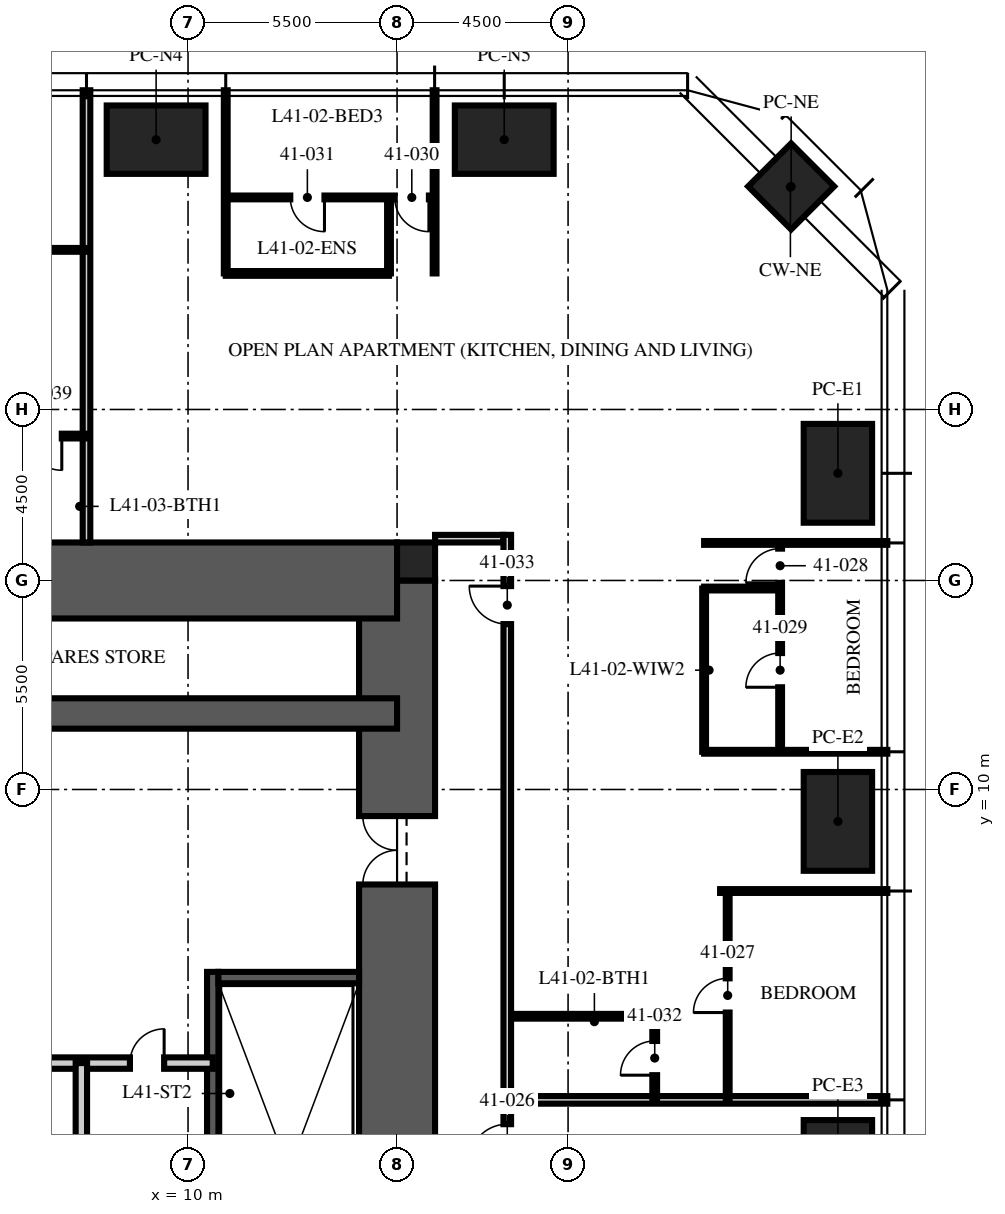
"""IFC4 building model, lengths in metres.
Left out: names, types, materials, properties, quantities, classifications, styles, units other than length and angle.
Written with IfcOpenShell. Run it as: python <this file> out.ifc"""

import sys

from ifc_helpers import new_model, si_unit, direction, frame, frame_2d, origin, origin_2d, place, context, subcontext, project, spatial, rectangle, extrude, element, fill, save


model = new_model("IFC4")
c1 = context("Model", 3, precision=1e-05, world=origin(), true_north=direction((0.0, 1.0)))
c2 = subcontext(c1, "Body", "Model", "MODEL_VIEW")
j1 = project(units=[si_unit("LENGTHUNIT", "METRE"), si_unit("PLANEANGLEUNIT", "RADIAN")], contexts=[c1])
p1 = place(None, origin())
s1 = spatial("IfcSite", under=j1, at=p1, CompositionType="ELEMENT")
p2 = place(p1, origin())
s2 = spatial("IfcBuilding", under=s1, at=p2, CompositionType="ELEMENT")
p3 = place(p2, frame((0.0, 0.0, 163.5)))
s3 = spatial("IfcBuildingStorey", under=s2, at=p3, CompositionType="ELEMENT", Elevation=163.5)
p4 = place(p3, frame((15.5, -15.5, -0.25), z_axis=(0.0, 0.0, 1.0), x_axis=(0.0, 1.0, 0.0)))
e1 = element("IfcWall", 1, at=p4, inside=s3, PredefinedType="SHEAR", context=c2, shape_type="SweptSolid", body=[
    extrude(rectangle(XDim=31.0, YDim=2.0, at=frame_2d((15.5, 0.0))), origin(), (0.0, 0.0, 1.0), 3.75),
])
p5 = place(p4, frame((6.5, 0.0, 0.25)))
e2 = element("IfcOpeningElement", 2, at=p5, cuts=e1, PredefinedType="OPENING", context=c2, shape_type="SweptSolid", body=[
    extrude(rectangle(XDim=1.2, YDim=2.1, at=frame_2d((0.6, 1.05))), frame((0.0, 1.01, 0.0), z_axis=(0.0, -1.0, 0.0), x_axis=(1.0, 0.0, 0.0)), (0.0, 0.0, 1.0), 2.02),
])
p6 = place(p4, frame((23.0, 0.0, 0.25)))
e3 = element("IfcOpeningElement", 3, at=p6, cuts=e1, PredefinedType="OPENING", context=c2, shape_type="SweptSolid", body=[
    extrude(rectangle(XDim=1.8, YDim=2.1, at=frame_2d((0.9, 1.05))), frame((0.0, 1.01, 0.0), z_axis=(0.0, -1.0, 0.0), x_axis=(1.0, 0.0, 0.0)), (0.0, 0.0, 1.0), 2.02),
])
p7 = place(p3, frame((-15.5, 15.5, -0.25), z_axis=(0.0, 0.0, 1.0), x_axis=(1.0, 0.0, 0.0)))
e4 = element("IfcWall", 4, at=p7, inside=s3, PredefinedType="SHEAR", context=c2, shape_type="SweptSolid", body=[
    extrude(rectangle(XDim=31.0, YDim=2.0, at=frame_2d((15.5, 0.0))), origin(), (0.0, 0.0, 1.0), 3.75),
])
p8 = place(p7, frame((5.0, 0.0, 0.25)))
e5 = element("IfcOpeningElement", 5, at=p8, cuts=e4, PredefinedType="OPENING", context=c2, shape_type="SweptSolid", body=[
    extrude(rectangle(XDim=1.0, YDim=2.1, at=frame_2d((0.5, 1.05))), frame((0.0, 1.01, 0.0), z_axis=(0.0, -1.0, 0.0), x_axis=(1.0, 0.0, 0.0)), (0.0, 0.0, 1.0), 2.02),
])
p9 = place(p3, frame((-15.5, 12.0, -0.25), z_axis=(0.0, 0.0, 1.0), x_axis=(1.0, 0.0, 0.0)))
e6 = element("IfcWall", 6, at=p9, inside=s3, PredefinedType="SHEAR", context=c2, shape_type="SweptSolid", body=[
    extrude(rectangle(XDim=31.0, YDim=0.8, at=frame_2d((15.5, 0.0))), origin(), (0.0, 0.0, 1.0), 3.75),
])
p10 = place(p3, frame((16.0, 16.0, -0.25), z_axis=(0.0, 0.0, 1.0), x_axis=(1.0, 0.0, 0.0)))
e7 = element("IfcColumn", 7, at=p10, inside=s3, PredefinedType="COLUMN", context=c2, shape_type="SweptSolid", body=[
    extrude(rectangle(XDim=1.0, YDim=1.0, at=origin_2d()), origin(), (0.0, 0.0, 1.0), 3.75),
])
for number, where, z_axis, x_axis in (
    (8, (9.16, 27.1, 0.0), (0.0, 0.0, 1.0), (1.0, 0.0, 0.0)),
    (9, (18.32, 27.1, 0.0), (0.0, 0.0, 1.0), (1.0, 0.0, 0.0)),
    (10, (27.1, 18.32, 0.0), (0.0, 0.0, 1.0), (0.0, 1.0, 0.0)),
    (11, (27.1, 9.16, 0.0), (0.0, 0.0, 1.0), (0.0, 1.0, 0.0)),
    (12, (27.1, 0.0, 0.0), (0.0, 0.0, 1.0), (0.0, 1.0, 0.0)),
):
    element("IfcColumn", number, at=place(p3, frame(where, z_axis=z_axis, x_axis=x_axis)), inside=s3, PredefinedType="COLUMN", context=c2, shape_type="SweptSolid", body=[
        extrude(rectangle(XDim=2.6, YDim=1.8, at=origin_2d()), origin(), (0.0, 0.0, 1.0), 3.75),
    ])
p11 = place(p3, frame((25.87, 25.87, 0.0), z_axis=(0.0, 0.0, 1.0), x_axis=(0.707106781187, -0.707106781187, 0.0)))
e13 = element("IfcColumn", 13, at=p11, inside=s3, PredefinedType="COLUMN", context=c2, shape_type="SweptSolid", body=[
    extrude(rectangle(XDim=1.6, YDim=1.6, at=origin_2d()), origin(), (0.0, 0.0, 1.0), 3.75),
])
p12 = place(p3, frame((10.65, -4.9, 0.0), z_axis=(0.0, 0.0, 1.0), x_axis=(0.0, 1.0, 0.0)))
e14 = element("IfcWall", 14, at=p12, inside=s3, PredefinedType="SOLIDWALL", context=c2, shape_type="SweptSolid", body=[
    extrude(rectangle(XDim=10.1, YDim=0.3, at=frame_2d((5.05, 0.0))), origin(), (0.0, 0.0, 1.0), 3.5),
])
p13 = place(p3, frame((14.5, 5.05, 0.0), z_axis=(0.0, 0.0, 1.0), x_axis=(-1.0, 0.0, 0.0)))
e15 = element("IfcWall", 15, at=p13, inside=s3, PredefinedType="SOLIDWALL", context=c2, shape_type="SweptSolid", body=[
    extrude(rectangle(XDim=3.7, YDim=0.3, at=frame_2d((1.85, 0.0))), origin(), (0.0, 0.0, 1.0), 3.5),
])
p14 = place(p3, frame((-10.65, 2.8, 0.0), z_axis=(0.0, 0.0, 1.0), x_axis=(1.0, 0.0, 0.0)))
e16 = element("IfcWall", 16, at=p14, inside=s3, PredefinedType="PARTITIONING", context=c2, shape_type="SweptSolid", body=[
    extrude(rectangle(XDim=21.3, YDim=0.3, at=frame_2d((10.65, 0.0))), origin(), (0.0, 0.0, 1.0), 3.5),
])
p15 = place(p14, frame((10.05, 0.0, 0.0)))
e17 = element("IfcOpeningElement", 17, at=p15, cuts=e16, PredefinedType="OPENING", context=c2, shape_type="SweptSolid", body=[
    extrude(rectangle(XDim=1.2, YDim=2.1, at=frame_2d((0.6, 1.05))), frame((0.0, 0.16, 0.0), z_axis=(0.0, -1.0, 0.0), x_axis=(1.0, 0.0, 0.0)), (0.0, 0.0, 1.0), 0.32),
])
p16 = place(p14, frame((19.121, 0.0, 0.0)))
e18 = element("IfcOpeningElement", 18, at=p16, cuts=e16, PredefinedType="OPENING", context=c2, shape_type="SweptSolid", body=[
    extrude(rectangle(XDim=0.9, YDim=2.1, at=frame_2d((0.45, 1.05))), frame((0.0, 0.16, 0.0), z_axis=(0.0, -1.0, 0.0), x_axis=(1.0, 0.0, 0.0)), (0.0, 0.0, 1.0), 0.32),
])
p17 = place(p3, frame((7.193, -6.65, 0.0), z_axis=(0.0, 0.0, 1.0), x_axis=(0.0, 1.0, 0.0)))
e19 = element("IfcWall", 19, at=p17, inside=s3, PredefinedType="PARTITIONING", context=c2, shape_type="SweptSolid", body=[
    extrude(rectangle(XDim=9.45, YDim=0.3, at=frame_2d((4.725, 0.0))), origin(), (0.0, 0.0, 1.0), 3.5),
])
p18 = place(p3, frame((16.5, 16.6, 0.0), z_axis=(0.0, 0.0, 1.0), x_axis=(1.0, 0.0, 0.0)))
e20 = element("IfcWall", 20, at=p18, inside=s3, PredefinedType="PARTITIONING", context=c2, shape_type="SweptSolid", body=[
    extrude(rectangle(XDim=1.8, YDim=0.2, at=frame_2d((0.9, 0.0))), origin(), (0.0, 0.0, 1.0), 2.3),
])
p19 = place(p3, frame((18.5, 1.832, 0.0), z_axis=(0.0, 0.0, 1.0), x_axis=(1.0, 0.0, 0.0)))
e21 = element("IfcWall", 21, at=p19, inside=s3, PredefinedType="PARTITIONING", context=c2, shape_type="SweptSolid", body=[
    extrude(rectangle(XDim=9.9, YDim=0.2, at=frame_2d((4.95, 0.0))), origin(), (0.0, 0.0, 1.0), 2.81),
])
p20 = place(p3, frame((24.0, 7.328, 0.0), z_axis=(0.0, 0.0, 1.0), x_axis=(1.0, 0.0, 0.0)))
e22 = element("IfcWall", 22, at=p20, inside=s3, PredefinedType="PARTITIONING", context=c2, shape_type="SweptSolid", body=[
    extrude(rectangle(XDim=4.4, YDim=0.1, at=frame_2d((2.2, 0.0))), origin(), (0.0, 0.0, 1.0), 2.81),
])
for number, where, z_axis, x_axis in (
    (23, (23.58, 10.992, 0.0), (0.0, 0.0, 1.0), (1.0, 0.0, 0.0)),
    (24, (23.58, 16.488, 0.0), (0.0, 0.0, 1.0), (1.0, 0.0, 0.0)),
    (25, (16.488, 23.58, 0.0), (0.0, 0.0, 1.0), (0.0, 1.0, 0.0)),
    (26, (10.992, 23.58, 0.0), (0.0, 0.0, 1.0), (0.0, 1.0, 0.0)),
):
    element("IfcWall", number, at=place(p3, frame(where, z_axis=z_axis, x_axis=x_axis)), inside=s3, PredefinedType="PARTITIONING", context=c2, shape_type="SweptSolid", body=[
        extrude(rectangle(XDim=4.82, YDim=0.1, at=frame_2d((2.41, 0.0))), origin(), (0.0, 0.0, 1.0), 2.81),
    ])
p21 = place(p3, frame((7.328, 16.5, 0.0), z_axis=(0.0, 0.0, 1.0), x_axis=(0.0, 1.0, 0.0)))
e27 = element("IfcWall", 27, at=p21, inside=s3, PredefinedType="PARTITIONING", context=c2, shape_type="SweptSolid", body=[
    extrude(rectangle(XDim=11.9, YDim=0.2, at=frame_2d((5.95, 0.0))), origin(), (0.0, 0.0, 1.0), 2.81),
])
p22 = place(p3, frame((24.2, 1.832, 0.0), z_axis=(0.0, 0.0, 1.0), x_axis=(0.0, 1.0, 0.0)))
e28 = element("IfcWall", 28, at=p22, inside=s3, PredefinedType="PARTITIONING", context=c2, shape_type="SweptSolid", body=[
    extrude(rectangle(XDim=5.496, YDim=0.1, at=frame_2d((2.748, 0.0))), origin(), (0.0, 0.0, 1.0), 2.81),
])
p23 = place(p22, frame((2.298, 0.0, 0.0)))
e29 = element("IfcOpeningElement", 29, at=p23, cuts=e28, PredefinedType="OPENING", context=c2, shape_type="SweptSolid", body=[
    extrude(rectangle(XDim=0.9, YDim=2.1, at=frame_2d((0.45, 1.05))), frame((0.0, 0.06, 0.0), z_axis=(0.0, -1.0, 0.0), x_axis=(1.0, 0.0, 0.0)), (0.0, 0.0, 1.0), 0.12),
])
p24 = place(p3, frame((25.58, 10.992, 0.0), z_axis=(0.0, 0.0, 1.0), x_axis=(0.0, 1.0, 0.0)))
e30 = element("IfcWall", 30, at=p24, inside=s3, PredefinedType="PARTITIONING", context=c2, shape_type="SweptSolid", body=[
    extrude(rectangle(XDim=5.496, YDim=0.1, at=frame_2d((2.748, 0.0))), origin(), (0.0, 0.0, 1.0), 2.81),
])
p25 = place(p24, frame((4.446, 0.0, 0.0)))
e31 = element("IfcOpeningElement", 31, at=p25, cuts=e30, PredefinedType="OPENING", context=c2, shape_type="SweptSolid", body=[
    extrude(rectangle(XDim=0.9, YDim=2.1, at=frame_2d((0.45, 1.05))), frame((0.0, 0.06, 0.0), z_axis=(0.0, -1.0, 0.0), x_axis=(1.0, 0.0, 0.0)), (0.0, 0.0, 1.0), 0.12),
])
p26 = place(p24, frame((1.698, 0.0, 0.0)))
e32 = element("IfcOpeningElement", 32, at=p26, cuts=e30, PredefinedType="OPENING", context=c2, shape_type="SweptSolid", body=[
    extrude(rectangle(XDim=0.9, YDim=2.1, at=frame_2d((0.45, 1.05))), frame((0.0, 0.06, 0.0), z_axis=(0.0, -1.0, 0.0), x_axis=(1.0, 0.0, 0.0)), (0.0, 0.0, 1.0), 0.12),
])
p27 = place(p3, frame((23.58, 15.288, 0.0), z_axis=(0.0, 0.0, 1.0), x_axis=(1.0, 0.0, 0.0)))
e33 = element("IfcWall", 33, at=p27, inside=s3, PredefinedType="PARTITIONING", context=c2, shape_type="SweptSolid", body=[
    extrude(rectangle(XDim=2.0, YDim=0.1, at=frame_2d((1.0, 0.0))), origin(), (0.0, 0.0, 1.0), 3.5),
])
p28 = place(p3, frame((23.58, 10.992, 0.0), z_axis=(0.0, 0.0, 1.0), x_axis=(0.0, 1.0, 0.0)))
e34 = element("IfcWall", 34, at=p28, inside=s3, PredefinedType="PARTITIONING", context=c2, shape_type="SweptSolid", body=[
    extrude(rectangle(XDim=4.296, YDim=0.1, at=frame_2d((2.148, 0.0))), origin(), (0.0, 0.0, 1.0), 2.81),
])
p29 = place(p3, frame((16.488, 25.58, 0.0), z_axis=(0.0, 0.0, 1.0), x_axis=(-1.0, 0.0, 0.0)))
e35 = element("IfcWall", 35, at=p29, inside=s3, PredefinedType="PARTITIONING", context=c2, shape_type="SweptSolid", body=[
    extrude(rectangle(XDim=5.496, YDim=0.1, at=frame_2d((2.748, 0.0))), origin(), (0.0, 0.0, 1.0), 2.81),
])
p30 = place(p29, frame((0.15, 0.0, 0.0)))
e36 = element("IfcOpeningElement", 36, at=p30, cuts=e35, PredefinedType="OPENING", context=c2, shape_type="SweptSolid", body=[
    extrude(rectangle(XDim=0.9, YDim=2.1, at=frame_2d((0.45, 1.05))), frame((0.0, 0.06, 0.0), z_axis=(0.0, -1.0, 0.0), x_axis=(1.0, 0.0, 0.0)), (0.0, 0.0, 1.0), 0.12),
])
p31 = place(p29, frame((2.898, 0.0, 0.0)))
e37 = element("IfcOpeningElement", 37, at=p31, cuts=e35, PredefinedType="OPENING", context=c2, shape_type="SweptSolid", body=[
    extrude(rectangle(XDim=0.9, YDim=2.1, at=frame_2d((0.45, 1.05))), frame((0.0, 0.06, 0.0), z_axis=(0.0, -1.0, 0.0), x_axis=(1.0, 0.0, 0.0)), (0.0, 0.0, 1.0), 0.12),
])
p32 = place(p3, frame((15.288, 23.58, 0.0), z_axis=(0.0, 0.0, 1.0), x_axis=(0.0, 1.0, 0.0)))
e38 = element("IfcWall", 38, at=p32, inside=s3, PredefinedType="PARTITIONING", context=c2, shape_type="SweptSolid", body=[
    extrude(rectangle(XDim=2.0, YDim=0.1, at=frame_2d((1.0, 0.0))), origin(), (0.0, 0.0, 1.0), 3.5),
])
p33 = place(p3, frame((15.288, 23.58, 0.0), z_axis=(0.0, 0.0, 1.0), x_axis=(-1.0, 0.0, 0.0)))
e39 = element("IfcWall", 39, at=p33, inside=s3, PredefinedType="PARTITIONING", context=c2, shape_type="SweptSolid", body=[
    extrude(rectangle(XDim=4.296, YDim=0.125, at=frame_2d((2.148, 0.0))), origin(), (0.0, 0.0, 1.0), 2.81),
])
p34 = place(p3, frame((22.28, 1.832, 0.0), z_axis=(0.0, 0.0, 1.0), x_axis=(0.0, 1.0, 0.0)))
e40 = element("IfcWall", 40, at=p34, inside=s3, PredefinedType="PARTITIONING", context=c2, shape_type="SweptSolid", body=[
    extrude(rectangle(XDim=2.2, YDim=0.125, at=frame_2d((1.1, 0.0))), origin(), (0.0, 0.0, 1.0), 3.5),
])
p35 = place(p34, frame((0.65, 0.0, 0.0)))
e41 = element("IfcOpeningElement", 41, at=p35, cuts=e40, PredefinedType="OPENING", context=c2, shape_type="SweptSolid", body=[
    extrude(rectangle(XDim=0.9, YDim=2.1, at=frame_2d((0.45, 1.05))), frame((0.0, 0.073, 0.0), z_axis=(0.0, -1.0, 0.0), x_axis=(1.0, 0.0, 0.0)), (0.0, 0.0, 1.0), 0.145),
])
p36 = place(p3, frame((18.5, 4.032, 0.0), z_axis=(0.0, 0.0, 1.0), x_axis=(1.0, 0.0, 0.0)))
e42 = element("IfcWall", 42, at=p36, inside=s3, PredefinedType="PARTITIONING", context=c2, shape_type="SweptSolid", body=[
    extrude(rectangle(XDim=3.78, YDim=0.125, at=frame_2d((1.89, 0.0))), origin(), (0.0, 0.0, 1.0), 3.5),
])
p37 = place(p3, frame((7.328, 24.2, 0.0), z_axis=(0.0, 0.0, 1.0), x_axis=(-1.0, 0.0, 0.0)))
e43 = element("IfcWall", 43, at=p37, inside=s3, PredefinedType="PARTITIONING", context=c2, shape_type="SweptSolid", body=[
    extrude(rectangle(XDim=5.496, YDim=0.1, at=frame_2d((2.748, 0.0))), origin(), (0.0, 0.0, 1.0), 2.81),
])
p38 = place(p37, frame((2.298, 0.0, 0.0)))
e44 = element("IfcOpeningElement", 44, at=p38, cuts=e43, PredefinedType="OPENING", context=c2, shape_type="SweptSolid", body=[
    extrude(rectangle(XDim=0.9, YDim=2.1, at=frame_2d((0.45, 1.05))), frame((0.0, 0.06, 0.0), z_axis=(0.0, -1.0, 0.0), x_axis=(1.0, 0.0, 0.0)), (0.0, 0.0, 1.0), 0.12),
])
p39 = place(p3, frame((7.328, 19.3, 0.0), z_axis=(0.0, 0.0, 1.0), x_axis=(-1.0, 0.0, 0.0)))
e45 = element("IfcWall", 45, at=p39, inside=s3, PredefinedType="PARTITIONING", context=c2, shape_type="SweptSolid", body=[
    extrude(rectangle(XDim=6.2, YDim=0.125, at=frame_2d((3.1, 0.0))), origin(), (0.0, 0.0, 1.0), 2.81),
])
p40 = place(p39, frame((0.65, 0.0, 0.0)))
e46 = element("IfcOpeningElement", 46, at=p40, cuts=e45, PredefinedType="OPENING", context=c2, shape_type="SweptSolid", body=[
    extrude(rectangle(XDim=0.9, YDim=2.1, at=frame_2d((0.45, 1.05))), frame((0.0, 0.073, 0.0), z_axis=(0.0, -1.0, 0.0), x_axis=(1.0, 0.0, 0.0)), (0.0, 0.0, 1.0), 0.145),
])
p41 = place(p39, frame((2.85, 0.0, 0.0)))
e47 = element("IfcOpeningElement", 47, at=p41, cuts=e45, PredefinedType="OPENING", context=c2, shape_type="SweptSolid", body=[
    extrude(rectangle(XDim=0.9, YDim=2.1, at=frame_2d((0.45, 1.05))), frame((0.0, 0.073, 0.0), z_axis=(0.0, -1.0, 0.0), x_axis=(1.0, 0.0, 0.0)), (0.0, 0.0, 1.0), 0.145),
])
p42 = place(p39, frame((4.85, 0.0, 0.0)))
e48 = element("IfcOpeningElement", 48, at=p42, cuts=e45, PredefinedType="OPENING", context=c2, shape_type="SweptSolid", body=[
    extrude(rectangle(XDim=0.9, YDim=2.1, at=frame_2d((0.45, 1.05))), frame((0.0, 0.073, 0.0), z_axis=(0.0, -1.0, 0.0), x_axis=(1.0, 0.0, 0.0)), (0.0, 0.0, 1.0), 0.145),
])
p43 = place(p3, frame((18.4, -18.3, 0.0), z_axis=(0.0, 0.0, 1.0), x_axis=(0.0, 1.0, 0.0)))
e49 = element("IfcWall", 49, at=p43, inside=s3, PredefinedType="PARTITIONING", context=c2, shape_type="SweptSolid", body=[
    extrude(rectangle(XDim=35.0, YDim=0.2, at=frame_2d((17.5, 0.0))), origin(), (0.0, 0.0, 1.0), 2.3),
])
p44 = place(p43, frame((18.492, 0.0, 0.0)))
e50 = element("IfcOpeningElement", 50, at=p44, cuts=e49, PredefinedType="OPENING", context=c2, shape_type="SweptSolid", body=[
    extrude(rectangle(XDim=1.0, YDim=2.2, at=frame_2d((0.5, 1.1))), frame((0.0, 0.11, 0.0), z_axis=(0.0, -1.0, 0.0), x_axis=(1.0, 0.0, 0.0)), (0.0, 0.0, 1.0), 0.22),
])
p45 = place(p43, frame((32.652, 0.0, 0.0)))
e51 = element("IfcOpeningElement", 51, at=p45, cuts=e49, PredefinedType="OPENING", context=c2, shape_type="SweptSolid", body=[
    extrude(rectangle(XDim=1.0, YDim=2.2, at=frame_2d((0.5, 1.1))), frame((0.0, 0.11, 0.0), z_axis=(0.0, -1.0, 0.0), x_axis=(1.0, 0.0, 0.0)), (0.0, 0.0, 1.0), 0.22),
])
p46 = place(p6, origin())
e52 = element("IfcDoor", 52, at=p46, inside=s3, OperationType="DOUBLE_DOOR_SINGLE_SWING", PredefinedType="DOOR", context=c2, shape_type="SweptSolid", body=[
    extrude(rectangle(XDim=1.8, YDim=2.1, at=frame_2d((0.9, 1.05))), frame((0.0, 0.025, 0.0), z_axis=(0.0, -1.0, 0.0), x_axis=(1.0, 0.0, 0.0)), (0.0, 0.0, 1.0), 0.05),
])
fill(e3, e52)
p47 = place(p16, origin())
e53 = element("IfcDoor", 53, at=p47, inside=s3, OperationType="SINGLE_SWING_RIGHT", PredefinedType="DOOR", context=c2, shape_type="SweptSolid", body=[
    extrude(rectangle(XDim=0.9, YDim=2.1, at=frame_2d((0.45, 1.05))), frame((0.0, 0.025, 0.0), z_axis=(0.0, -1.0, 0.0), x_axis=(1.0, 0.0, 0.0)), (0.0, 0.0, 1.0), 0.05),
])
fill(e18, e53)
p48 = place(p44, origin())
e54 = element("IfcDoor", 54, at=p48, inside=s3, OperationType="SINGLE_SWING_LEFT", PredefinedType="DOOR", context=c2, shape_type="SweptSolid", body=[
    extrude(rectangle(XDim=1.0, YDim=2.2, at=frame_2d((0.5, 1.1))), frame((0.0, 0.025, 0.0), z_axis=(0.0, -1.0, 0.0), x_axis=(1.0, 0.0, 0.0)), (0.0, 0.0, 1.0), 0.05),
])
fill(e50, e54)
p49 = place(p23, origin())
e55 = element("IfcDoor", 55, at=p49, inside=s3, OperationType="SINGLE_SWING_LEFT", PredefinedType="DOOR", context=c2, shape_type="SweptSolid", body=[
    extrude(rectangle(XDim=0.9, YDim=2.1, at=frame_2d((0.45, 1.05))), frame((0.0, 0.025, 0.0), z_axis=(0.0, -1.0, 0.0), x_axis=(1.0, 0.0, 0.0)), (0.0, 0.0, 1.0), 0.05),
])
fill(e29, e55)
p50 = place(p25, origin())
e56 = element("IfcDoor", 56, at=p50, inside=s3, OperationType="SINGLE_SWING_LEFT", PredefinedType="DOOR", context=c2, shape_type="SweptSolid", body=[
    extrude(rectangle(XDim=0.9, YDim=2.1, at=frame_2d((0.45, 1.05))), frame((0.0, 0.025, 0.0), z_axis=(0.0, -1.0, 0.0), x_axis=(1.0, 0.0, 0.0)), (0.0, 0.0, 1.0), 0.05),
])
fill(e31, e56)
p51 = place(p26, origin())
e57 = element("IfcDoor", 57, at=p51, inside=s3, OperationType="SINGLE_SWING_LEFT", PredefinedType="DOOR", context=c2, shape_type="SweptSolid", body=[
    extrude(rectangle(XDim=0.9, YDim=2.1, at=frame_2d((0.45, 1.05))), frame((0.0, 0.025, 0.0), z_axis=(0.0, -1.0, 0.0), x_axis=(1.0, 0.0, 0.0)), (0.0, 0.0, 1.0), 0.05),
])
fill(e32, e57)
p52 = place(p30, origin())
e58 = element("IfcDoor", 58, at=p52, inside=s3, OperationType="SINGLE_SWING_LEFT", PredefinedType="DOOR", context=c2, shape_type="SweptSolid", body=[
    extrude(rectangle(XDim=0.9, YDim=2.1, at=frame_2d((0.45, 1.05))), frame((0.0, 0.025, 0.0), z_axis=(0.0, -1.0, 0.0), x_axis=(1.0, 0.0, 0.0)), (0.0, 0.0, 1.0), 0.05),
])
fill(e36, e58)
p53 = place(p31, origin())
e59 = element("IfcDoor", 59, at=p53, inside=s3, OperationType="SINGLE_SWING_LEFT", PredefinedType="DOOR", context=c2, shape_type="SweptSolid", body=[
    extrude(rectangle(XDim=0.9, YDim=2.1, at=frame_2d((0.45, 1.05))), frame((0.0, 0.025, 0.0), z_axis=(0.0, -1.0, 0.0), x_axis=(1.0, 0.0, 0.0)), (0.0, 0.0, 1.0), 0.05),
])
fill(e37, e59)
p54 = place(p35, origin())
e60 = element("IfcDoor", 60, at=p54, inside=s3, OperationType="SINGLE_SWING_LEFT", PredefinedType="DOOR", context=c2, shape_type="SweptSolid", body=[
    extrude(rectangle(XDim=0.9, YDim=2.1, at=frame_2d((0.45, 1.05))), frame((0.0, 0.025, 0.0), z_axis=(0.0, -1.0, 0.0), x_axis=(1.0, 0.0, 0.0)), (0.0, 0.0, 1.0), 0.05),
])
fill(e41, e60)
p55 = place(p45, origin())
e61 = element("IfcDoor", 61, at=p55, inside=s3, OperationType="SINGLE_SWING_RIGHT", PredefinedType="DOOR", context=c2, shape_type="SweptSolid", body=[
    extrude(rectangle(XDim=1.0, YDim=2.2, at=frame_2d((0.5, 1.1))), frame((0.0, 0.025, 0.0), z_axis=(0.0, -1.0, 0.0), x_axis=(1.0, 0.0, 0.0)), (0.0, 0.0, 1.0), 0.05),
])
fill(e51, e61)
p56 = place(p40, origin())
e62 = element("IfcDoor", 62, at=p56, inside=s3, OperationType="SINGLE_SWING_LEFT", PredefinedType="DOOR", context=c2, shape_type="SweptSolid", body=[
    extrude(rectangle(XDim=0.9, YDim=2.1, at=frame_2d((0.45, 1.05))), frame((0.0, 0.025, 0.0), z_axis=(0.0, -1.0, 0.0), x_axis=(1.0, 0.0, 0.0)), (0.0, 0.0, 1.0), 0.05),
])
fill(e46, e62)
save(model, sys.argv[1])
